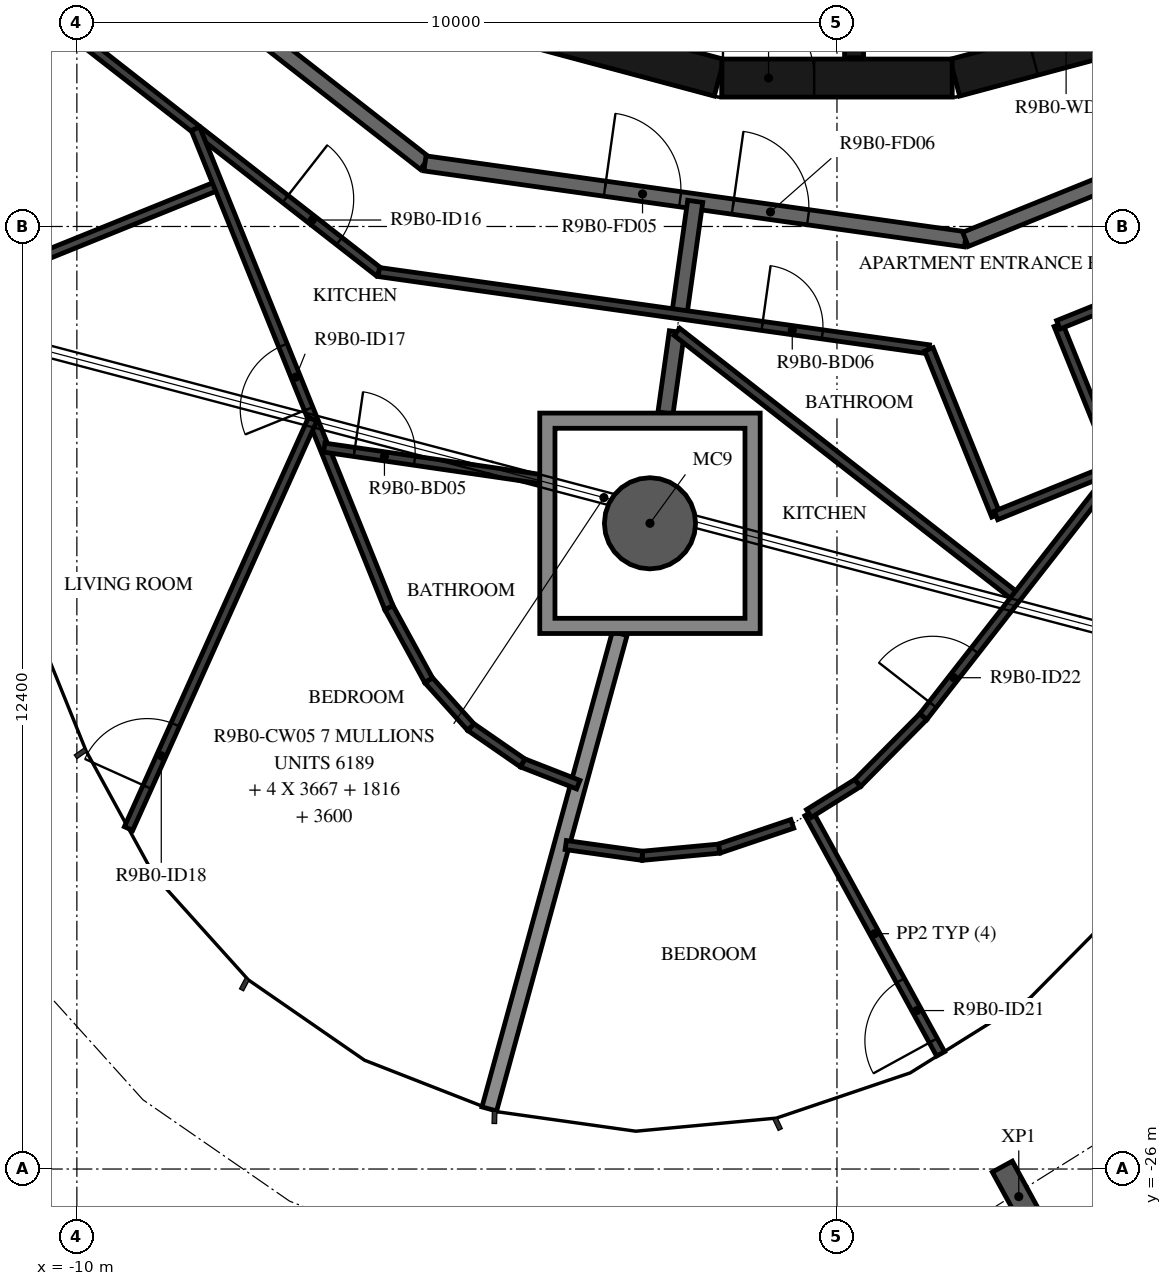
"""IFC4 building model, lengths in metres.
Left out: names, types, materials, properties, quantities, classifications, styles, units other than length and angle.
Written with IfcOpenShell. Run it as: python <this file> out.ifc"""

import sys

from ifc_helpers import new_model, si_unit, direction, frame, frame_2d, origin, origin_2d, place, context, subcontext, project, spatial, polyline, rectangle, hollow_circle, i_section, outline, extrude, element, fill, save


model = new_model("IFC4")
c1 = context("Model", 3, precision=1e-05, world=origin(), true_north=direction((0.0, 1.0)))
c2 = subcontext(c1, "Body", "Model", "MODEL_VIEW")
j1 = project(units=[si_unit("LENGTHUNIT", "METRE"), si_unit("PLANEANGLEUNIT", "RADIAN")], contexts=[c1])
p1 = place(None, origin())
s1 = spatial("IfcSite", under=j1, at=p1, CompositionType="ELEMENT")
p2 = place(p1, origin())
s2 = spatial("IfcBuilding", under=s1, at=p2, CompositionType="ELEMENT")
p3 = place(p2, frame((0.0, 0.0, 347.0)))
s3 = spatial("IfcBuildingStorey", under=s2, at=p3, CompositionType="ELEMENT", Elevation=347.0)
p4 = place(p3, frame((-2.46, -17.505, -0.38), z_axis=(0.0, 0.0, 1.0), x_axis=(1.0, 0.0, 0.0)))
e1 = element("IfcColumn", 1, at=p4, inside=s3, PredefinedType="COLUMN", context=c2, shape_type="SweptSolid", body=[
    extrude(hollow_circle(Radius=0.6, WallThickness=0.03, at=origin_2d()), origin(), (0.0, 0.0, 1.0), 3.5),
])
p5 = place(p3, frame((2.392, -26.363, -0.38), z_axis=(0.0, 0.0, 1.0), x_axis=(-0.877055410309, -0.480389224741, 0.0)))
e2 = element("IfcColumn", 2, at=p5, inside=s3, PredefinedType="COLUMN", context=c2, shape_type="SweptSolid", body=[
    extrude(i_section(OverallWidth=0.3, OverallDepth=0.9, WebThickness=0.019, FlangeThickness=0.035, FilletRadius=0.03, at=origin_2d()), origin(), (0.0, 0.0, 1.0), 3.5),
])
p6 = place(p3, frame((1.55, -11.643, 0.0), z_axis=(0.0, 0.0, 1.0), x_axis=(0.965948410781, 0.258734743916, 0.0)))
e3 = element("IfcWall", 3, at=p6, inside=s3, PredefinedType="SHEAR", context=c2, shape_type="SweptSolid", body=[
    extrude(rectangle(XDim=3.033, YDim=0.5, at=frame_2d((1.516, 0.0))), origin(), (0.0, 0.0, 1.0), 3.12),
])
p7 = place(p6, frame((1.066, 0.0, 0.0)))
e4 = element("IfcOpeningElement", 4, at=p7, cuts=e3, PredefinedType="OPENING", context=c2, shape_type="SweptSolid", body=[
    extrude(rectangle(XDim=0.9, YDim=2.1, at=frame_2d((0.45, 1.05))), frame((0.0, 0.26, 0.0), z_axis=(0.0, -1.0, 0.0), x_axis=(1.0, 0.0, 0.0)), (0.0, 0.0, 1.0), 0.52),
])
p8 = place(p3, frame((-4.479, -10.858, 0.0), z_axis=(0.0, 0.0, 1.0), x_axis=(0.965948410781, -0.258734743916, 0.0)))
e5 = element("IfcWall", 5, at=p8, inside=s3, PredefinedType="SHEAR", context=c2, shape_type="SweptSolid", body=[
    extrude(rectangle(XDim=3.033, YDim=0.5, at=frame_2d((1.516, 0.0))), origin(), (0.0, 0.0, 1.0), 3.12),
])
p9 = place(p3, frame((-1.516, -11.647, 0.0), z_axis=(0.0, 0.0, 1.0), x_axis=(1.0, 0.0, 0.0)))
e6 = element("IfcWall", 6, at=p9, inside=s3, PredefinedType="SHEAR", context=c2, shape_type="SweptSolid", body=[
    extrude(rectangle(XDim=3.033, YDim=0.5, at=frame_2d((1.516, 0.0))), origin(), (0.0, 0.0, 1.0), 3.12),
])
p10 = place(p9, frame((0.016, 0.0, 0.0)))
e7 = element("IfcOpeningElement", 7, at=p10, cuts=e6, PredefinedType="OPENING", context=c2, shape_type="SweptSolid", body=[
    extrude(rectangle(XDim=1.2, YDim=2.1, at=frame_2d((0.6, 1.05))), frame((0.0, 0.26, 0.0), z_axis=(0.0, -1.0, 0.0), x_axis=(1.0, 0.0, 0.0)), (0.0, 0.0, 1.0), 0.52),
])
p11 = place(p3, frame((0.225, -8.97, 0.0), z_axis=(0.0, 0.0, 1.0), x_axis=(0.0, -1.0, 0.0)))
e8 = element("IfcWall", 8, at=p11, inside=s3, PredefinedType="SHEAR", context=c2, shape_type="SweptSolid", body=[
    extrude(rectangle(XDim=2.41, YDim=0.25, at=frame_2d((1.205, 0.0))), origin(), (0.0, 0.0, 1.0), 3.12),
])
p12 = place(p3, frame((-11.079, -8.349, 0.0), z_axis=(0.0, 0.0, 1.0), x_axis=(0.78800478687, -0.615669112324, 0.0)))
e9 = element("IfcWall", 9, at=p12, inside=s3, PredefinedType="STANDARD", context=c2, shape_type="SweptSolid", body=[
    extrude(rectangle(XDim=7.181, YDim=0.2, at=frame_2d((3.591, 0.0))), origin(), (0.0, 0.0, 1.0), 3.12),
])
p13 = place(p3, frame((-5.42, -12.77, 0.0), z_axis=(0.0, 0.0, 1.0), x_axis=(0.990270565508, -0.139155334385, 0.0)))
e10 = element("IfcWall", 10, at=p13, inside=s3, PredefinedType="STANDARD", context=c2, shape_type="SweptSolid", body=[
    extrude(rectangle(XDim=7.181, YDim=0.2, at=frame_2d((3.59, 0.0))), origin(), (0.0, 0.0, 1.0), 3.12),
])
p14 = place(p13, frame((2.39, 0.0, 0.0)))
e11 = element("IfcOpeningElement", 11, at=p14, cuts=e10, PredefinedType="OPENING", context=c2, shape_type="SweptSolid", body=[
    extrude(rectangle(XDim=1.0, YDim=2.1, at=frame_2d((0.5, 1.05))), frame((0.0, 0.11, 0.0), z_axis=(0.0, -1.0, 0.0), x_axis=(1.0, 0.0, 0.0)), (0.0, 0.0, 1.0), 0.22),
])
p15 = place(p13, frame((4.091, 0.0, 0.0)))
e12 = element("IfcOpeningElement", 12, at=p15, cuts=e10, PredefinedType="OPENING", context=c2, shape_type="SweptSolid", body=[
    extrude(rectangle(XDim=1.0, YDim=2.1, at=frame_2d((0.5, 1.05))), frame((0.0, 0.11, 0.0), z_axis=(0.0, -1.0, 0.0), x_axis=(1.0, 0.0, 0.0)), (0.0, 0.0, 1.0), 0.22),
])
p16 = place(p3, frame((1.691, -13.769, 0.0), z_axis=(0.0, 0.0, 1.0), x_axis=(0.92717916932, 0.374618189599, 0.0)))
e13 = element("IfcWall", 13, at=p16, inside=s3, PredefinedType="STANDARD", context=c2, shape_type="SweptSolid", body=[
    extrude(rectangle(XDim=7.181, YDim=0.2, at=frame_2d((3.591, 0.0))), origin(), (0.0, 0.0, 1.0), 3.12),
])
p17 = place(p3, frame((-2.073, -14.755, 0.0), z_axis=(0.0, 0.0, 1.0), x_axis=(0.139005431033, 0.990291618738, 0.0)))
e14 = element("IfcWall", 14, at=p17, inside=s3, PredefinedType="STANDARD", context=c2, shape_type="SweptSolid", body=[
    extrude(rectangle(XDim=1.5, YDim=0.2, at=frame_2d((0.75, 0.0))), origin(), (0.0, 0.0, 1.0), 3.12),
])
p18 = place(p3, frame((-2.256, -16.055, 0.0), z_axis=(0.0, 0.0, 1.0), x_axis=(0.139109268657, 0.990277037689, 0.0)))
e15 = element("IfcWall", 15, at=p18, inside=s3, PredefinedType="STANDARD", context=c2, shape_type="SweptSolid", body=[
    extrude(rectangle(XDim=1.079, YDim=0.2, at=frame_2d((0.54, 0.0))), origin(), (0.0, 0.0, 1.0), 3.12),
])
p19 = place(p3, frame((-4.574, -25.21, 0.0), z_axis=(0.0, 0.0, 1.0), x_axis=(0.264579024648, 0.964364007892, 0.0)))
e16 = element("IfcWall", 16, at=p19, inside=s3, PredefinedType="STANDARD", context=c2, shape_type="SweptSolid", body=[
    extrude(rectangle(XDim=6.486, YDim=0.2, at=frame_2d((3.243, 0.0))), origin(), (0.0, 0.0, 1.0), 2.73),
])
p20 = place(p3, frame((-12.319, -9.283, 0.0), z_axis=(0.0, 0.0, 1.0), x_axis=(0.788000268464, -0.61567489546, 0.0)))
e17 = element("IfcWall", 17, at=p20, inside=s3, PredefinedType="PARTITIONING", context=c2, shape_type="SweptSolid", body=[
    extrude(rectangle(XDim=7.985, YDim=0.12, at=frame_2d((3.992, 0.0))), origin(), (0.0, 0.0, 1.0), 3.12),
])
p21 = place(p20, frame((6.423, 0.0, 0.0)))
e18 = element("IfcOpeningElement", 18, at=p21, cuts=e17, PredefinedType="OPENING", context=c2, shape_type="SweptSolid", body=[
    extrude(rectangle(XDim=0.9, YDim=2.1, at=frame_2d((0.45, 1.05))), frame((0.0, 0.07, 0.0), z_axis=(0.0, -1.0, 0.0), x_axis=(1.0, 0.0, 0.0)), (0.0, 0.0, 1.0), 0.14),
])
p22 = place(p3, frame((-6.027, -14.199, 0.0), z_axis=(0.0, 0.0, 1.0), x_axis=(0.990271617837, -0.139147845494, 0.0)))
e19 = element("IfcWall", 19, at=p22, inside=s3, PredefinedType="PARTITIONING", context=c2, shape_type="SweptSolid", body=[
    extrude(rectangle(XDim=7.308, YDim=0.12, at=frame_2d((3.654, 0.0))), origin(), (0.0, 0.0, 1.0), 3.12),
])
p23 = place(p22, frame((5.093, 0.0, 0.0)))
e20 = element("IfcOpeningElement", 20, at=p23, cuts=e19, PredefinedType="OPENING", context=c2, shape_type="SweptSolid", body=[
    extrude(rectangle(XDim=0.8, YDim=2.1, at=frame_2d((0.4, 1.05))), frame((0.0, 0.07, 0.0), z_axis=(0.0, -1.0, 0.0), x_axis=(1.0, 0.0, 0.0)), (0.0, 0.0, 1.0), 0.14),
])
p24 = place(p3, frame((-12.219, -14.708, 0.0), z_axis=(0.0, 0.0, 1.0), x_axis=(0.927189216671, 0.374593321469, 0.0)))
e21 = element("IfcWall", 21, at=p24, inside=s3, PredefinedType="PARTITIONING", context=c2, shape_type="SweptSolid", body=[
    extrude(rectangle(XDim=4.4, YDim=0.12, at=frame_2d((2.2, 0.0))), origin(), (0.0, 0.0, 1.0), 2.73),
])
p25 = place(p3, frame((-5.894, -18.616, 0.0), z_axis=(0.0, 0.0, 1.0), x_axis=(-0.374596683143, 0.927187858515, 0.0)))
e22 = element("IfcWall", 22, at=p25, inside=s3, PredefinedType="PARTITIONING", context=c2, shape_type="SweptSolid", body=[
    extrude(rectangle(XDim=6.796, YDim=0.12, at=frame_2d((3.398, 0.0))), origin(), (0.0, 0.0, 1.0), 3.12),
])
p26 = place(p25, frame((2.822, 0.0, 0.0)))
e23 = element("IfcOpeningElement", 23, at=p26, cuts=e22, PredefinedType="OPENING", context=c2, shape_type="SweptSolid", body=[
    extrude(rectangle(XDim=0.9, YDim=2.1, at=frame_2d((0.45, 1.05))), frame((0.0, 0.07, 0.0), z_axis=(0.0, -1.0, 0.0), x_axis=(1.0, 0.0, 0.0)), (0.0, 0.0, 1.0), 0.14),
])
p27 = place(p3, frame((-9.32, -21.521, 0.0), z_axis=(0.0, 0.0, 1.0), x_axis=(0.410206582363, 0.911992631432, 0.0)))
e24 = element("IfcWall", 24, at=p27, inside=s3, PredefinedType="PARTITIONING", context=c2, shape_type="SweptSolid", body=[
    extrude(rectangle(XDim=5.908, YDim=0.12, at=frame_2d((2.954, 0.0))), origin(), (0.0, 0.0, 1.0), 3.12),
])
p28 = place(p27, frame((0.6, 0.0, 0.0)))
e25 = element("IfcOpeningElement", 25, at=p28, cuts=e24, PredefinedType="OPENING", context=c2, shape_type="SweptSolid", body=[
    extrude(rectangle(XDim=0.9, YDim=2.1, at=frame_2d((0.45, 1.05))), frame((0.0, 0.07, 0.0), z_axis=(0.0, -1.0, 0.0), x_axis=(1.0, 0.0, 0.0)), (0.0, 0.0, 1.0), 0.14),
])
p29 = place(p3, frame((-6.745, -16.509, 0.0), z_axis=(0.0, 0.0, 1.0), x_axis=(0.989610924185, -0.143771411393, 0.0)))
e26 = element("IfcWall", 26, at=p29, inside=s3, PredefinedType="PARTITIONING", context=c2, shape_type="SweptSolid", body=[
    extrude(rectangle(XDim=2.865, YDim=0.12, at=frame_2d((1.432, 0.0))), origin(), (0.0, 0.0, 1.0), 3.12),
])
p30 = place(p29, frame((0.4, 0.0, 0.0)))
e27 = element("IfcOpeningElement", 27, at=p30, cuts=e26, PredefinedType="OPENING", context=c2, shape_type="SweptSolid", body=[
    extrude(rectangle(XDim=0.8, YDim=2.1, at=frame_2d((0.4, 1.05))), frame((0.0, 0.07, 0.0), z_axis=(0.0, -1.0, 0.0), x_axis=(1.0, 0.0, 0.0)), (0.0, 0.0, 1.0), 0.14),
])
p31 = place(p3, frame((-3.404, -20.943, 0.0), z_axis=(0.0, 0.0, 1.0), x_axis=(-0.931485289212, 0.363778993321, 0.0)))
e28 = element("IfcWall", 28, at=p31, inside=s3, PredefinedType="PARTITIONING", context=c2, shape_type="SweptSolid", body=[
    extrude(rectangle(XDim=0.787, YDim=0.12, at=frame_2d((0.393, 0.0))), origin(), (0.0, 0.0, 1.0), 3.12),
])
p32 = place(p3, frame((-4.136, -20.657, 0.0), z_axis=(0.0, 0.0, 1.0), x_axis=(-0.822552500908, 0.568689179826, 0.0)))
e29 = element("IfcWall", 29, at=p32, inside=s3, PredefinedType="PARTITIONING", context=c2, shape_type="SweptSolid", body=[
    extrude(rectangle(XDim=0.829, YDim=0.12, at=frame_2d((0.415, 0.0))), origin(), (0.0, 0.0, 1.0), 3.12),
])
p33 = place(p3, frame((-4.818, -20.186, 0.0), z_axis=(0.0, 0.0, 1.0), x_axis=(-0.669013557227, 0.743250200301, 0.0)))
e30 = element("IfcWall", 30, at=p33, inside=s3, PredefinedType="PARTITIONING", context=c2, shape_type="SweptSolid", body=[
    extrude(rectangle(XDim=0.829, YDim=0.12, at=frame_2d((0.415, 0.0))), origin(), (0.0, 0.0, 1.0), 3.12),
])
p34 = place(p3, frame((-5.373, -19.57, 0.0), z_axis=(0.0, 0.0, 1.0), x_axis=(-0.479796131471, 0.87738000446, 0.0)))
e31 = element("IfcWall", 31, at=p34, inside=s3, PredefinedType="PARTITIONING", context=c2, shape_type="SweptSolid", body=[
    extrude(rectangle(XDim=1.087, YDim=0.12, at=frame_2d((0.543, 0.0))), origin(), (0.0, 0.0, 1.0), 3.12),
])
p35 = place(p3, frame((1.209, -15.216, 0.0), z_axis=(0.0, 0.0, 1.0), x_axis=(0.374531550488, -0.927214170345, 0.0)))
e32 = element("IfcWall", 32, at=p35, inside=s3, PredefinedType="PARTITIONING", context=c2, shape_type="SweptSolid", body=[
    extrude(rectangle(XDim=2.357, YDim=0.12, at=frame_2d((1.179, 0.0))), origin(), (0.0, 0.0, 1.0), 3.12),
])
p36 = place(p3, frame((2.092, -17.402, 0.0), z_axis=(0.0, 0.0, 1.0), x_axis=(0.927153589835, 0.374681492546, 0.0)))
e33 = element("IfcWall", 33, at=p36, inside=s3, PredefinedType="PARTITIONING", context=c2, shape_type="SweptSolid", body=[
    extrude(rectangle(XDim=1.7, YDim=0.12, at=frame_2d((0.85, 0.0))), origin(), (0.0, 0.0, 1.0), 3.12),
])
p37 = place(p3, frame((3.668, -16.765, 0.0), z_axis=(0.0, 0.0, 1.0), x_axis=(-0.374621045498, 0.927178015416, 0.0)))
e34 = element("IfcWall", 34, at=p37, inside=s3, PredefinedType="PARTITIONING", context=c2, shape_type="SweptSolid", body=[
    extrude(rectangle(XDim=2.018, YDim=0.12, at=frame_2d((1.009, 0.0))), origin(), (0.0, 0.0, 1.0), 3.12),
])
p38 = place(p3, frame((2.912, -14.894, 0.0), z_axis=(0.0, 0.0, 1.0), x_axis=(0.927182280165, 0.374610490174, 0.0)))
e35 = element("IfcWall", 35, at=p38, inside=s3, PredefinedType="PARTITIONING", context=c2, shape_type="SweptSolid", body=[
    extrude(rectangle(XDim=6.872, YDim=0.12, at=frame_2d((3.436, 0.0))), origin(), (0.0, 0.0, 1.0), 3.12),
])
p39 = place(p38, frame((3.748, 0.0, 0.0)))
e36 = element("IfcOpeningElement", 36, at=p39, cuts=e35, PredefinedType="OPENING", context=c2, shape_type="SweptSolid", body=[
    extrude(rectangle(XDim=0.9, YDim=2.1, at=frame_2d((0.45, 1.05))), frame((0.0, 0.07, 0.0), z_axis=(0.0, -1.0, 0.0), x_axis=(1.0, 0.0, 0.0)), (0.0, 0.0, 1.0), 0.14),
])
p40 = place(p3, frame((-0.588, -21.459, 0.0), z_axis=(0.0, 0.0, 1.0), x_axis=(-0.94737753159, -0.320118435332, 0.0)))
e37 = element("IfcWall", 37, at=p40, inside=s3, PredefinedType="PARTITIONING", context=c2, shape_type="SweptSolid", body=[
    extrude(rectangle(XDim=1.016, YDim=0.12, at=frame_2d((0.508, 0.0))), origin(), (0.0, 0.0, 1.0), 3.12),
])
p41 = place(p3, frame((-1.55, -21.785, 0.0), z_axis=(0.0, 0.0, 1.0), x_axis=(-0.995667655176, -0.092983441736, 0.0)))
e38 = element("IfcWall", 38, at=p41, inside=s3, PredefinedType="PARTITIONING", context=c2, shape_type="SweptSolid", body=[
    extrude(rectangle(XDim=1.016, YDim=0.12, at=frame_2d((0.508, 0.0))), origin(), (0.0, 0.0, 1.0), 3.12),
])
p42 = place(p3, frame((-2.562, -21.879, 0.0), z_axis=(0.0, 0.0, 1.0), x_axis=(-0.990273657549, 0.139133328736, 0.0)))
e39 = element("IfcWall", 39, at=p42, inside=s3, PredefinedType="PARTITIONING", context=c2, shape_type="SweptSolid", body=[
    extrude(rectangle(XDim=1.016, YDim=0.12, at=frame_2d((0.508, 0.0))), origin(), (0.0, 0.0, 1.0), 3.12),
])
p43 = place(p3, frame((1.363, -24.485, 0.0), z_axis=(0.0, 0.0, 1.0), x_axis=(-0.480374148719, 0.877063667725, 0.0)))
e40 = element("IfcWall", 40, at=p43, inside=s3, PredefinedType="PARTITIONING", context=c2, shape_type="SweptSolid", body=[
    extrude(rectangle(XDim=3.606, YDim=0.12, at=frame_2d((1.803, 0.0))), origin(), (0.0, 0.0, 1.0), 2.73),
])
p44 = place(p43, frame((0.2, 0.0, 0.0)))
e41 = element("IfcOpeningElement", 41, at=p44, cuts=e40, PredefinedType="OPENING", context=c2, shape_type="SweptSolid", body=[
    extrude(rectangle(XDim=0.9, YDim=2.1, at=frame_2d((0.45, 1.05))), frame((0.0, 0.07, 0.0), z_axis=(0.0, -1.0, 0.0), x_axis=(1.0, 0.0, 0.0)), (0.0, 0.0, 1.0), 0.14),
])
p45 = place(p3, frame((2.363, -18.478, 0.0), z_axis=(0.0, 0.0, 1.0), x_axis=(-0.788010669333, 0.615661583191, 0.0)))
e42 = element("IfcWall", 42, at=p45, inside=s3, PredefinedType="PARTITIONING", context=c2, shape_type="SweptSolid", body=[
    extrude(rectangle(XDim=5.672, YDim=0.12, at=frame_2d((2.836, 0.0))), origin(), (0.0, 0.0, 1.0), 3.12),
])
p46 = place(p3, frame((-0.369, -21.323, 0.0), z_axis=(0.0, 0.0, 1.0), x_axis=(0.847998304005, 0.529998940003, 0.0)))
e43 = element("IfcWall", 43, at=p46, inside=s3, PredefinedType="PARTITIONING", context=c2, shape_type="SweptSolid", body=[
    extrude(rectangle(XDim=0.758, YDim=0.12, at=frame_2d((0.379, 0.0))), origin(), (0.0, 0.0, 1.0), 3.12),
])
p47 = place(p3, frame((0.274, -20.921, 0.0), z_axis=(0.0, 0.0, 1.0), x_axis=(0.702915150142, 0.711273710818, 0.0)))
e44 = element("IfcWall", 44, at=p47, inside=s3, PredefinedType="PARTITIONING", context=c2, shape_type="SweptSolid", body=[
    extrude(rectangle(XDim=1.227, YDim=0.12, at=frame_2d((0.613, 0.0))), origin(), (0.0, 0.0, 1.0), 3.12),
])
p48 = place(p3, frame((1.136, -20.049, 0.0), z_axis=(0.0, 0.0, 1.0), x_axis=(0.615662465763, 0.788009979792, 0.0)))
e45 = element("IfcWall", 45, at=p48, inside=s3, PredefinedType="PARTITIONING", context=c2, shape_type="SweptSolid", body=[
    extrude(rectangle(XDim=8.229, YDim=0.12, at=frame_2d((4.114, 0.0))), origin(), (0.0, 0.0, 1.0), 3.12),
])
p49 = place(p48, frame((0.2, 0.0, 0.0)))
e46 = element("IfcOpeningElement", 46, at=p49, cuts=e45, PredefinedType="OPENING", context=c2, shape_type="SweptSolid", body=[
    extrude(rectangle(XDim=0.9, YDim=2.1, at=frame_2d((0.45, 1.05))), frame((0.0, 0.07, 0.0), z_axis=(0.0, -1.0, 0.0), x_axis=(1.0, 0.0, 0.0)), (0.0, 0.0, 1.0), 0.14),
])
p50 = place(p3, origin())
e47 = element("IfcWall", 47, at=p50, inside=s3, PredefinedType="STANDARD", context=c2, shape_type="SweptSolid", body=[
    extrude(outline(polyline([(-1.01, -16.055), (-1.01, -18.955), (-3.91, -18.955), (-3.91, -16.055), (-1.01, -16.055)]), holes=[polyline([(-3.71, -18.755), (-1.21, -18.755), (-1.21, -16.255), (-3.71, -16.255), (-3.71, -18.755)])]), origin(), (0.0, 0.0, 1.0), 3.12),
])
p51 = place(p10, origin())
e48 = element("IfcDoor", 48, at=p51, inside=s3, OperationType="SINGLE_SWING_RIGHT", PredefinedType="DOOR", context=c2, shape_type="SweptSolid", body=[
    extrude(rectangle(XDim=1.2, YDim=2.1, at=frame_2d((0.6, 1.05))), frame((0.0, 0.025, 0.0), z_axis=(0.0, -1.0, 0.0), x_axis=(1.0, 0.0, 0.0)), (0.0, 0.0, 1.0), 0.05),
])
fill(e7, e48)
p52 = place(p7, origin())
e49 = element("IfcDoor", 49, at=p52, inside=s3, OperationType="SINGLE_SWING_RIGHT", PredefinedType="DOOR", context=c2, shape_type="SweptSolid", body=[
    extrude(rectangle(XDim=0.9, YDim=2.1, at=frame_2d((0.45, 1.05))), frame((0.0, 0.025, 0.0), z_axis=(0.0, -1.0, 0.0), x_axis=(1.0, 0.0, 0.0)), (0.0, 0.0, 1.0), 0.05),
])
fill(e4, e49)
p53 = place(p14, origin())
e50 = element("IfcDoor", 50, at=p53, inside=s3, OperationType="SINGLE_SWING_RIGHT", PredefinedType="DOOR", context=c2, shape_type="SweptSolid", body=[
    extrude(rectangle(XDim=1.0, YDim=2.1, at=frame_2d((0.5, 1.05))), frame((0.0, 0.025, 0.0), z_axis=(0.0, -1.0, 0.0), x_axis=(1.0, 0.0, 0.0)), (0.0, 0.0, 1.0), 0.05),
])
fill(e11, e50)
p54 = place(p21, origin())
e51 = element("IfcDoor", 51, at=p54, inside=s3, OperationType="SINGLE_SWING_RIGHT", PredefinedType="DOOR", context=c2, shape_type="SweptSolid", body=[
    extrude(rectangle(XDim=0.9, YDim=2.1, at=frame_2d((0.45, 1.05))), frame((0.0, 0.025, 0.0), z_axis=(0.0, -1.0, 0.0), x_axis=(1.0, 0.0, 0.0)), (0.0, 0.0, 1.0), 0.05),
])
fill(e18, e51)
p55 = place(p26, origin())
e52 = element("IfcDoor", 52, at=p55, inside=s3, OperationType="SINGLE_SWING_RIGHT", PredefinedType="DOOR", context=c2, shape_type="SweptSolid", body=[
    extrude(rectangle(XDim=0.9, YDim=2.1, at=frame_2d((0.45, 1.05))), frame((0.0, 0.025, 0.0), z_axis=(0.0, -1.0, 0.0), x_axis=(1.0, 0.0, 0.0)), (0.0, 0.0, 1.0), 0.05),
])
fill(e23, e52)
p56 = place(p28, origin())
e53 = element("IfcDoor", 53, at=p56, inside=s3, OperationType="SINGLE_SWING_RIGHT", PredefinedType="DOOR", context=c2, shape_type="SweptSolid", body=[
    extrude(rectangle(XDim=0.9, YDim=2.1, at=frame_2d((0.45, 1.05))), frame((0.0, 0.025, 0.0), z_axis=(0.0, -1.0, 0.0), x_axis=(1.0, 0.0, 0.0)), (0.0, 0.0, 1.0), 0.05),
])
fill(e25, e53)
p57 = place(p30, origin())
e54 = element("IfcDoor", 54, at=p57, inside=s3, OperationType="SINGLE_SWING_RIGHT", PredefinedType="DOOR", context=c2, shape_type="SweptSolid", body=[
    extrude(rectangle(XDim=0.8, YDim=2.1, at=frame_2d((0.4, 1.05))), frame((0.0, 0.025, 0.0), z_axis=(0.0, -1.0, 0.0), x_axis=(1.0, 0.0, 0.0)), (0.0, 0.0, 1.0), 0.05),
])
fill(e27, e54)
p58 = place(p15, origin())
e55 = element("IfcDoor", 55, at=p58, inside=s3, OperationType="SINGLE_SWING_RIGHT", PredefinedType="DOOR", context=c2, shape_type="SweptSolid", body=[
    extrude(rectangle(XDim=1.0, YDim=2.1, at=frame_2d((0.5, 1.05))), frame((0.0, 0.025, 0.0), z_axis=(0.0, -1.0, 0.0), x_axis=(1.0, 0.0, 0.0)), (0.0, 0.0, 1.0), 0.05),
])
fill(e12, e55)
p59 = place(p23, origin())
e56 = element("IfcDoor", 56, at=p59, inside=s3, OperationType="SINGLE_SWING_LEFT", PredefinedType="DOOR", context=c2, shape_type="SweptSolid", body=[
    extrude(rectangle(XDim=0.8, YDim=2.1, at=frame_2d((0.4, 1.05))), frame((0.0, 0.025, 0.0), z_axis=(0.0, -1.0, 0.0), x_axis=(1.0, 0.0, 0.0)), (0.0, 0.0, 1.0), 0.05),
])
fill(e20, e56)
p60 = place(p44, origin())
e57 = element("IfcDoor", 57, at=p60, inside=s3, OperationType="SINGLE_SWING_LEFT", PredefinedType="DOOR", context=c2, shape_type="SweptSolid", body=[
    extrude(rectangle(XDim=0.9, YDim=2.1, at=frame_2d((0.45, 1.05))), frame((0.0, 0.025, 0.0), z_axis=(0.0, -1.0, 0.0), x_axis=(1.0, 0.0, 0.0)), (0.0, 0.0, 1.0), 0.05),
])
fill(e41, e57)
p61 = place(p49, origin())
e58 = element("IfcDoor", 58, at=p61, inside=s3, OperationType="SINGLE_SWING_RIGHT", PredefinedType="DOOR", context=c2, shape_type="SweptSolid", body=[
    extrude(rectangle(XDim=0.9, YDim=2.1, at=frame_2d((0.45, 1.05))), frame((0.0, 0.025, 0.0), z_axis=(0.0, -1.0, 0.0), x_axis=(1.0, 0.0, 0.0)), (0.0, 0.0, 1.0), 0.05),
])
fill(e46, e58)
save(model, sys.argv[1])
